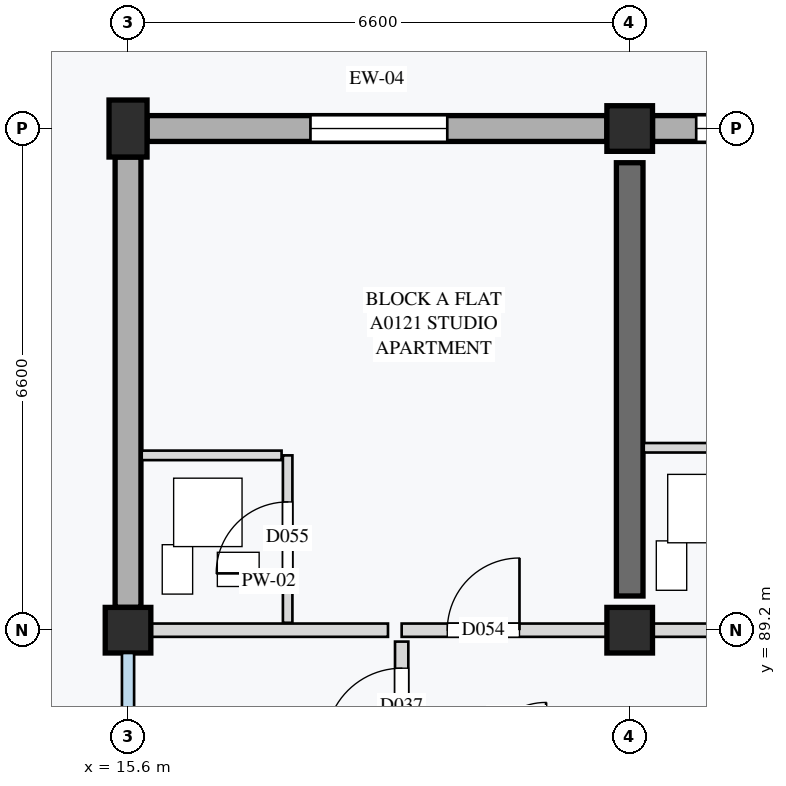
"""IFC4 building model, lengths in metres.
Left out: names, types, materials, properties, quantities, classifications, styles, units other than length and angle.
Written with IfcOpenShell. Run it as: python <this file> out.ifc"""

import sys

from ifc_helpers import new_model, si_unit, direction, frame, frame_2d, origin, origin_2d, place, context, subcontext, project, spatial, rectangle, extrude, element, fill, save


model = new_model("IFC4")
c1 = context("Model", 3, precision=1e-05, world=origin(), true_north=direction((0.0, 1.0)))
c2 = subcontext(c1, "Body", "Model", "MODEL_VIEW")
j1 = project(units=[si_unit("LENGTHUNIT", "METRE"), si_unit("PLANEANGLEUNIT", "RADIAN")], contexts=[c1])
p1 = place(None, origin())
s1 = spatial("IfcSite", under=j1, at=p1, CompositionType="ELEMENT")
p2 = place(p1, origin())
s2 = spatial("IfcBuilding", under=s1, at=p2, CompositionType="ELEMENT")
p3 = place(p2, frame((0.0, 0.0, 4.2)))
s3 = spatial("IfcBuildingStorey", under=s2, at=p3, CompositionType="ELEMENT", Elevation=4.2)
p4 = place(p3, frame((15.6, 89.2, 0.0), z_axis=(0.0, 0.0, 1.0), x_axis=(1.0, 0.0, 0.0)))
e1 = element("IfcColumn", 1, at=p4, inside=s3, PredefinedType="COLUMN", context=c2, shape_type="SweptSolid", body=[
    extrude(rectangle(XDim=0.6, YDim=0.6, at=origin_2d()), origin(), (0.0, 0.0, 1.0), 4.2),
])
p5 = place(p3, frame((15.6, 95.8, 0.0), z_axis=(0.0, 0.0, 1.0), x_axis=(1.0, 0.0, 0.0)))
e2 = element("IfcColumn", 2, at=p5, inside=s3, PredefinedType="COLUMN", context=c2, shape_type="SweptSolid", body=[
    extrude(rectangle(XDim=0.5, YDim=0.75, at=origin_2d()), origin(), (0.0, 0.0, 1.0), 4.2),
])
for number, where, z_axis, x_axis in (
    (3, (22.2, 89.2, 0.0), (0.0, 0.0, 1.0), (1.0, 0.0, 0.0)),
    (4, (22.2, 95.8, 0.0), (0.0, 0.0, 1.0), (1.0, 0.0, 0.0)),
):
    element("IfcColumn", number, at=place(p3, frame(where, z_axis=z_axis, x_axis=x_axis)), inside=s3, PredefinedType="COLUMN", context=c2, shape_type="SweptSolid", body=[
        extrude(rectangle(XDim=0.6, YDim=0.6, at=origin_2d()), origin(), (0.0, 0.0, 1.0), 4.2),
    ])
p6 = place(p3, frame((22.2, 89.65, 0.0), z_axis=(0.0, 0.0, 1.0), x_axis=(0.0, 1.0, 0.0)))
e5 = element("IfcWall", 5, at=p6, inside=s3, PredefinedType="SHEAR", context=c2, shape_type="SweptSolid", body=[
    extrude(rectangle(XDim=5.7, YDim=0.35, at=frame_2d((2.85, 0.0))), origin(), (0.0, 0.0, 1.0), 3.96),
])
p7 = place(p3, frame((15.85, 95.8, 0.0), z_axis=(0.0, 0.0, 1.0), x_axis=(1.0, 0.0, 0.0)))
e6 = element("IfcWall", 6, at=p7, inside=s3, PredefinedType="STANDARD", context=c2, shape_type="SweptSolid", body=[
    extrude(rectangle(XDim=6.05, YDim=0.34, at=frame_2d((3.025, 0.0))), origin(), (0.0, 0.0, 1.0), 3.6),
])
p8 = place(p7, frame((2.15, 0.0, 0.85)))
e7 = element("IfcOpeningElement", 7, at=p8, cuts=e6, PredefinedType="OPENING", context=c2, shape_type="SweptSolid", body=[
    extrude(rectangle(XDim=1.8, YDim=1.35, at=frame_2d((0.9, 0.675))), frame((0.0, 0.18, 0.0), z_axis=(0.0, -1.0, 0.0), x_axis=(1.0, 0.0, 0.0)), (0.0, 0.0, 1.0), 0.36),
])
p9 = place(p3, frame((22.5, 95.8, 0.0), z_axis=(0.0, 0.0, 1.0), x_axis=(1.0, 0.0, 0.0)))
e8 = element("IfcWall", 8, at=p9, inside=s3, PredefinedType="STANDARD", context=c2, shape_type="SweptSolid", body=[
    extrude(rectangle(XDim=6.0, YDim=0.34, at=frame_2d((3.0, 0.0))), origin(), (0.0, 0.0, 1.0), 3.6),
])
p10 = place(p9, frame((0.575, 0.0, 0.85)))
e9 = element("IfcOpeningElement", 9, at=p10, cuts=e8, PredefinedType="OPENING", context=c2, shape_type="SweptSolid", body=[
    extrude(rectangle(XDim=1.8, YDim=1.35, at=frame_2d((0.9, 0.675))), frame((0.0, 0.18, 0.0), z_axis=(0.0, -1.0, 0.0), x_axis=(1.0, 0.0, 0.0)), (0.0, 0.0, 1.0), 0.36),
])
p11 = place(p9, frame((4.0, 0.0, 0.85)))
e10 = element("IfcOpeningElement", 10, at=p11, cuts=e8, PredefinedType="OPENING", context=c2, shape_type="SweptSolid", body=[
    extrude(rectangle(XDim=1.5, YDim=1.35, at=frame_2d((0.75, 0.675))), frame((0.0, 0.18, 0.0), z_axis=(0.0, -1.0, 0.0), x_axis=(1.0, 0.0, 0.0)), (0.0, 0.0, 1.0), 0.36),
])
p12 = place(p3, frame((15.6, 89.5, 0.0), z_axis=(0.0, 0.0, 1.0), x_axis=(0.0, 1.0, 0.0)))
e11 = element("IfcWall", 11, at=p12, inside=s3, PredefinedType="STANDARD", context=c2, shape_type="SweptSolid", body=[
    extrude(rectangle(XDim=5.925, YDim=0.34, at=frame_2d((2.962, 0.0))), origin(), (0.0, 0.0, 1.0), 3.65),
])
p13 = place(p3, frame((19.2, 86.05, 0.0), z_axis=(0.0, 0.0, 1.0), x_axis=(0.0, 1.0, 0.0)))
e12 = element("IfcWall", 12, at=p13, inside=s3, PredefinedType="PARTITIONING", context=c2, shape_type="SweptSolid", body=[
    extrude(rectangle(XDim=3.0, YDim=0.175, at=frame_2d((1.5, 0.0))), origin(), (0.0, 0.0, 1.0), 3.96),
])
p14 = place(p13, frame((1.65, 0.0, 0.0)))
e13 = element("IfcOpeningElement", 13, at=p14, cuts=e12, PredefinedType="OPENING", context=c2, shape_type="SweptSolid", body=[
    extrude(rectangle(XDim=1.0, YDim=2.16, at=frame_2d((0.5, 1.08))), frame((0.0, 0.097, 0.0), z_axis=(0.0, -1.0, 0.0), x_axis=(1.0, 0.0, 0.0)), (0.0, 0.0, 1.0), 0.195),
])
p15 = place(p3, frame((15.88, 89.2, 0.0), z_axis=(0.0, 0.0, 1.0), x_axis=(1.0, 0.0, 0.0)))
e14 = element("IfcWall", 14, at=p15, inside=s3, PredefinedType="PARTITIONING", context=c2, shape_type="SweptSolid", body=[
    extrude(rectangle(XDim=3.14, YDim=0.175, at=frame_2d((1.57, 0.0))), origin(), (0.0, 0.0, 1.0), 3.7),
])
p16 = place(p3, frame((19.2, 89.2, 0.0), z_axis=(0.0, 0.0, 1.0), x_axis=(1.0, 0.0, 0.0)))
e15 = element("IfcWall", 15, at=p16, inside=s3, PredefinedType="PARTITIONING", context=c2, shape_type="SweptSolid", body=[
    extrude(rectangle(XDim=3.0, YDim=0.175, at=frame_2d((1.5, 0.0))), origin(), (0.0, 0.0, 1.0), 3.7),
])
p17 = place(p16, frame((0.6, 0.0, 0.0)))
e16 = element("IfcOpeningElement", 16, at=p17, cuts=e15, PredefinedType="OPENING", context=c2, shape_type="SweptSolid", body=[
    extrude(rectangle(XDim=0.95, YDim=2.1, at=frame_2d((0.475, 1.05))), frame((0.0, 0.097, 0.0), z_axis=(0.0, -1.0, 0.0), x_axis=(1.0, 0.0, 0.0)), (0.0, 0.0, 1.0), 0.195),
])
p18 = place(p3, frame((17.7, 89.298, 0.0), z_axis=(0.0, 0.0, 1.0), x_axis=(0.0, 1.0, 0.0)))
e17 = element("IfcWall", 17, at=p18, inside=s3, PredefinedType="PARTITIONING", context=c2, shape_type="SweptSolid", body=[
    extrude(rectangle(XDim=2.202, YDim=0.125, at=frame_2d((1.101, 0.0))), origin(), (0.0, 0.0, 1.0), 3.96),
])
p19 = place(p18, frame((0.65, 0.0, 0.0)))
e18 = element("IfcOpeningElement", 18, at=p19, cuts=e17, PredefinedType="OPENING", context=c2, shape_type="SweptSolid", body=[
    extrude(rectangle(XDim=0.94, YDim=2.08, at=frame_2d((0.47, 1.04))), frame((0.0, 0.073, 0.0), z_axis=(0.0, -1.0, 0.0), x_axis=(1.0, 0.0, 0.0)), (0.0, 0.0, 1.0), 0.145),
])
p20 = place(p3, frame((15.78, 91.5, 0.0), z_axis=(0.0, 0.0, 1.0), x_axis=(1.0, 0.0, 0.0)))
e19 = element("IfcWall", 19, at=p20, inside=s3, PredefinedType="PARTITIONING", context=c2, shape_type="SweptSolid", body=[
    extrude(rectangle(XDim=1.84, YDim=0.125, at=frame_2d((0.92, 0.0))), origin(), (0.0, 0.0, 1.0), 3.96),
])
p21 = place(p3, frame((22.2, 89.2, 0.0), z_axis=(0.0, 0.0, 1.0), x_axis=(1.0, 0.0, 0.0)))
e20 = element("IfcWall", 20, at=p21, inside=s3, PredefinedType="PARTITIONING", context=c2, shape_type="SweptSolid", body=[
    extrude(rectangle(XDim=6.6, YDim=0.175, at=frame_2d((3.3, 0.0))), origin(), (0.0, 0.0, 1.0), 3.7),
])
p22 = place(p21, frame((3.85, 0.0, 0.0)))
e21 = element("IfcOpeningElement", 21, at=p22, cuts=e20, PredefinedType="OPENING", context=c2, shape_type="SweptSolid", body=[
    extrude(rectangle(XDim=0.92, YDim=2.14, at=frame_2d((0.46, 1.07))), frame((0.0, 0.097, 0.0), z_axis=(0.0, -1.0, 0.0), x_axis=(1.0, 0.0, 0.0)), (0.0, 0.0, 1.0), 0.195),
])
p23 = place(p3, frame((22.385, 91.6, 0.0), z_axis=(0.0, 0.0, 1.0), x_axis=(1.0, 0.0, 0.0)))
e22 = element("IfcWall", 22, at=p23, inside=s3, PredefinedType="PARTITIONING", context=c2, shape_type="SweptSolid", body=[
    extrude(rectangle(XDim=1.635, YDim=0.125, at=frame_2d((0.817, 0.0))), origin(), (0.0, 0.0, 1.0), 3.96),
])
p24 = place(p8, origin())
e23 = element("IfcWindow", 23, at=p24, inside=s3, PartitioningType="SINGLE_PANEL", PredefinedType="WINDOW", context=c2, shape_type="SweptSolid", body=[
    extrude(rectangle(XDim=1.8, YDim=1.35, at=frame_2d((0.9, 0.675))), frame((0.0, 0.03, 0.0), z_axis=(0.0, -1.0, 0.0), x_axis=(1.0, 0.0, 0.0)), (0.0, 0.0, 1.0), 0.06),
])
fill(e7, e23)
p25 = place(p10, origin())
e24 = element("IfcWindow", 24, at=p25, inside=s3, PartitioningType="SINGLE_PANEL", PredefinedType="WINDOW", context=c2, shape_type="SweptSolid", body=[
    extrude(rectangle(XDim=1.8, YDim=1.35, at=frame_2d((0.9, 0.675))), frame((0.0, 0.03, 0.0), z_axis=(0.0, -1.0, 0.0), x_axis=(1.0, 0.0, 0.0)), (0.0, 0.0, 1.0), 0.06),
])
fill(e9, e24)
p26 = place(p14, origin())
e25 = element("IfcDoor", 25, at=p26, inside=s3, OperationType="SINGLE_SWING_LEFT", PredefinedType="DOOR", context=c2, shape_type="SweptSolid", body=[
    extrude(rectangle(XDim=1.0, YDim=2.16, at=frame_2d((0.5, 1.08))), frame((0.0, 0.025, 0.0), z_axis=(0.0, -1.0, 0.0), x_axis=(1.0, 0.0, 0.0)), (0.0, 0.0, 1.0), 0.05),
])
fill(e13, e25)
p27 = place(p17, origin())
e26 = element("IfcDoor", 26, at=p27, inside=s3, OperationType="SINGLE_SWING_RIGHT", PredefinedType="DOOR", context=c2, shape_type="SweptSolid", body=[
    extrude(rectangle(XDim=0.95, YDim=2.1, at=frame_2d((0.475, 1.05))), frame((0.0, 0.025, 0.0), z_axis=(0.0, -1.0, 0.0), x_axis=(1.0, 0.0, 0.0)), (0.0, 0.0, 1.0), 0.05),
])
fill(e16, e26)
p28 = place(p19, origin())
e27 = element("IfcDoor", 27, at=p28, inside=s3, OperationType="SINGLE_SWING_LEFT", PredefinedType="DOOR", context=c2, shape_type="SweptSolid", body=[
    extrude(rectangle(XDim=0.94, YDim=2.08, at=frame_2d((0.47, 1.04))), frame((0.0, 0.025, 0.0), z_axis=(0.0, -1.0, 0.0), x_axis=(1.0, 0.0, 0.0)), (0.0, 0.0, 1.0), 0.05),
])
fill(e18, e27)
save(model, sys.argv[1])
